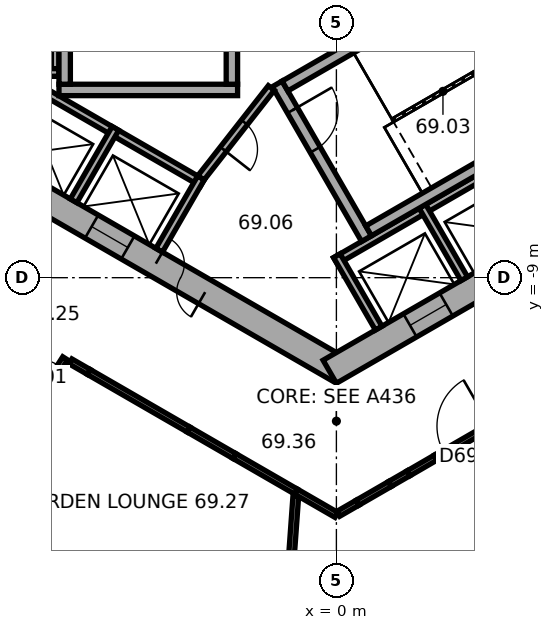
"""IFC4 building model, lengths in metres.
Left out: names, types, materials, properties, quantities, classifications, styles, units other than length and angle.
Written with IfcOpenShell. Run it as: python <this file> out.ifc"""

import sys

from ifc_helpers import new_model, si_unit, direction, frame, frame_2d, origin, place, context, subcontext, project, spatial, rectangle, extrude, element, fill, save


model = new_model("IFC4")
c1 = context("Model", 3, precision=1e-05, world=origin(), true_north=direction((0.0, 1.0)))
c2 = subcontext(c1, "Body", "Model", "MODEL_VIEW")
j1 = project(units=[si_unit("LENGTHUNIT", "METRE"), si_unit("PLANEANGLEUNIT", "RADIAN")], contexts=[c1])
p1 = place(None, origin())
s1 = spatial("IfcSite", under=j1, at=p1, CompositionType="ELEMENT")
p2 = place(p1, origin())
s2 = spatial("IfcBuilding", under=s1, at=p2, CompositionType="ELEMENT")
p3 = place(p2, frame((0.0, 0.0, 278.3)))
s3 = spatial("IfcBuildingStorey", under=s2, at=p3, CompositionType="ELEMENT", Elevation=278.3)
p4 = place(p3, frame((-10.025, -5.586, 0.0), z_axis=(0.0, 0.0, 1.0), x_axis=(0.866026453023, -0.499998182661, 0.0)))
e1 = element("IfcWall", 1, at=p4, inside=s3, PredefinedType="SHEAR", context=c2, shape_type="SweptSolid", body=[
    extrude(rectangle(XDim=11.778, YDim=0.7, at=frame_2d((5.889, 0.0))), origin(), (0.0, 0.0, 1.0), 7.4),
])
p5 = place(p4, frame((6.089, 0.0, 0.0)))
e2 = element("IfcOpeningElement", 2, at=p5, cuts=e1, PredefinedType="OPENING", context=c2, shape_type="SweptSolid", body=[
    extrude(rectangle(XDim=1.5, YDim=2.1, at=frame_2d((0.75, 1.05))), frame((0.0, 0.36, 0.0), z_axis=(0.0, -1.0, 0.0), x_axis=(1.0, 0.0, 0.0)), (0.0, 0.0, 1.0), 0.72),
])
p6 = place(p4, frame((1.539, 0.0, 0.0)))
e3 = element("IfcOpeningElement", 3, at=p6, cuts=e1, PredefinedType="OPENING", context=c2, shape_type="SweptSolid", body=[
    extrude(rectangle(XDim=1.1, YDim=2.1, at=frame_2d((0.55, 1.05))), frame((0.0, 0.36, 0.0), z_axis=(0.0, -1.0, 0.0), x_axis=(1.0, 0.0, 0.0)), (0.0, 0.0, 1.0), 0.72),
])
p7 = place(p4, frame((4.139, 0.0, 0.0)))
e4 = element("IfcOpeningElement", 4, at=p7, cuts=e1, PredefinedType="OPENING", context=c2, shape_type="SweptSolid", body=[
    extrude(rectangle(XDim=1.1, YDim=2.1, at=frame_2d((0.55, 1.05))), frame((0.0, 0.36, 0.0), z_axis=(0.0, -1.0, 0.0), x_axis=(1.0, 0.0, 0.0)), (0.0, 0.0, 1.0), 0.72),
])
p8 = place(p3, frame((-0.175, -11.475, 0.0), z_axis=(0.0, 0.0, 1.0), x_axis=(0.866026453023, 0.499998182661, 0.0)))
e5 = element("IfcWall", 5, at=p8, inside=s3, PredefinedType="SHEAR", context=c2, shape_type="SweptSolid", body=[
    extrude(rectangle(XDim=11.778, YDim=0.7, at=frame_2d((5.889, 0.0))), origin(), (0.0, 0.0, 1.0), 7.4),
])
p9 = place(p8, frame((2.439, 0.0, 0.0)))
e6 = element("IfcOpeningElement", 6, at=p9, cuts=e5, PredefinedType="OPENING", context=c2, shape_type="SweptSolid", body=[
    extrude(rectangle(XDim=1.1, YDim=2.1, at=frame_2d((0.55, 1.05))), frame((0.0, 0.36, 0.0), z_axis=(0.0, -1.0, 0.0), x_axis=(1.0, 0.0, 0.0)), (0.0, 0.0, 1.0), 0.72),
])
p10 = place(p8, frame((5.039, 0.0, 0.0)))
e7 = element("IfcOpeningElement", 7, at=p10, cuts=e5, PredefinedType="OPENING", context=c2, shape_type="SweptSolid", body=[
    extrude(rectangle(XDim=1.1, YDim=2.1, at=frame_2d((0.55, 1.05))), frame((0.0, 0.36, 0.0), z_axis=(0.0, -1.0, 0.0), x_axis=(1.0, 0.0, 0.0)), (0.0, 0.0, 1.0), 0.72),
])
p11 = place(p8, frame((7.639, 0.0, 0.0)))
e8 = element("IfcOpeningElement", 8, at=p11, cuts=e5, PredefinedType="OPENING", context=c2, shape_type="SweptSolid", body=[
    extrude(rectangle(XDim=1.1, YDim=2.1, at=frame_2d((0.55, 1.05))), frame((0.0, 0.36, 0.0), z_axis=(0.0, -1.0, 0.0), x_axis=(1.0, 0.0, 0.0)), (0.0, 0.0, 1.0), 0.72),
])
p12 = place(p3, frame((-16.626, -12.629, 0.0), z_axis=(0.0, 0.0, 1.0), x_axis=(0.866026460444, -0.499998169808, 0.0)))
e9 = element("IfcWall", 9, at=p12, inside=s3, PredefinedType="STANDARD", context=c2, shape_type="SweptSolid", body=[
    extrude(rectangle(XDim=17.731, YDim=0.2, at=frame_2d((8.866, 0.0))), origin(), (0.0, 0.0, 1.0), 7.4),
])
p13 = place(p12, frame((1.203, 0.0, 0.8)))
e10 = element("IfcOpeningElement", 10, at=p13, cuts=e9, PredefinedType="OPENING", context=c2, shape_type="SweptSolid", body=[
    extrude(rectangle(XDim=2.0, YDim=4.2, at=frame_2d((1.0, 2.1))), frame((0.0, 0.11, 0.0), z_axis=(0.0, -1.0, 0.0), x_axis=(1.0, 0.0, 0.0)), (0.0, 0.0, 1.0), 0.22),
])
p14 = place(p12, frame((4.535, 0.0, 0.8)))
e11 = element("IfcOpeningElement", 11, at=p14, cuts=e9, PredefinedType="OPENING", context=c2, shape_type="SweptSolid", body=[
    extrude(rectangle(XDim=2.0, YDim=4.2, at=frame_2d((1.0, 2.1))), frame((0.0, 0.11, 0.0), z_axis=(0.0, -1.0, 0.0), x_axis=(1.0, 0.0, 0.0)), (0.0, 0.0, 1.0), 0.22),
])
p15 = place(p12, frame((7.867, 0.0, 0.8)))
e12 = element("IfcOpeningElement", 12, at=p15, cuts=e9, PredefinedType="OPENING", context=c2, shape_type="SweptSolid", body=[
    extrude(rectangle(XDim=2.0, YDim=4.2, at=frame_2d((1.0, 2.1))), frame((0.0, 0.11, 0.0), z_axis=(0.0, -1.0, 0.0), x_axis=(1.0, 0.0, 0.0)), (0.0, 0.0, 1.0), 0.22),
])
p16 = place(p12, frame((11.198, 0.0, 0.8)))
e13 = element("IfcOpeningElement", 13, at=p16, cuts=e9, PredefinedType="OPENING", context=c2, shape_type="SweptSolid", body=[
    extrude(rectangle(XDim=2.0, YDim=4.2, at=frame_2d((1.0, 2.1))), frame((0.0, 0.11, 0.0), z_axis=(0.0, -1.0, 0.0), x_axis=(1.0, 0.0, 0.0)), (0.0, 0.0, 1.0), 0.22),
])
p17 = place(p12, frame((14.53, 0.0, 0.8)))
e14 = element("IfcOpeningElement", 14, at=p17, cuts=e9, PredefinedType="OPENING", context=c2, shape_type="SweptSolid", body=[
    extrude(rectangle(XDim=2.0, YDim=4.2, at=frame_2d((1.0, 2.1))), frame((0.0, 0.11, 0.0), z_axis=(0.0, -1.0, 0.0), x_axis=(1.0, 0.0, 0.0)), (0.0, 0.0, 1.0), 0.22),
])
p18 = place(p3, frame((2.58, -21.377, 0.0), z_axis=(0.0, 0.0, 1.0), x_axis=(0.833888592176, 0.551932800112, 0.0)))
e15 = element("IfcWall", 15, at=p18, inside=s3, PredefinedType="STANDARD", context=c2, shape_type="SweptSolid", body=[
    extrude(rectangle(XDim=17.731, YDim=0.2, at=frame_2d((8.866, 0.0))), origin(), (0.0, 0.0, 1.0), 7.4),
])
p19 = place(p18, frame((1.202, 0.0, 0.8)))
e16 = element("IfcOpeningElement", 16, at=p19, cuts=e15, PredefinedType="OPENING", context=c2, shape_type="SweptSolid", body=[
    extrude(rectangle(XDim=2.0, YDim=4.2, at=frame_2d((1.0, 2.1))), frame((0.0, 0.11, 0.0), z_axis=(0.0, -1.0, 0.0), x_axis=(1.0, 0.0, 0.0)), (0.0, 0.0, 1.0), 0.22),
])
p20 = place(p18, frame((4.533, 0.0, 0.8)))
e17 = element("IfcOpeningElement", 17, at=p20, cuts=e15, PredefinedType="OPENING", context=c2, shape_type="SweptSolid", body=[
    extrude(rectangle(XDim=2.0, YDim=4.2, at=frame_2d((1.0, 2.1))), frame((0.0, 0.11, 0.0), z_axis=(0.0, -1.0, 0.0), x_axis=(1.0, 0.0, 0.0)), (0.0, 0.0, 1.0), 0.22),
])
p21 = place(p18, frame((7.865, 0.0, 0.8)))
e18 = element("IfcOpeningElement", 18, at=p21, cuts=e15, PredefinedType="OPENING", context=c2, shape_type="SweptSolid", body=[
    extrude(rectangle(XDim=2.0, YDim=4.2, at=frame_2d((1.0, 2.1))), frame((0.0, 0.11, 0.0), z_axis=(0.0, -1.0, 0.0), x_axis=(1.0, 0.0, 0.0)), (0.0, 0.0, 1.0), 0.22),
])
p22 = place(p18, frame((11.197, 0.0, 0.8)))
e19 = element("IfcOpeningElement", 19, at=p22, cuts=e15, PredefinedType="OPENING", context=c2, shape_type="SweptSolid", body=[
    extrude(rectangle(XDim=2.0, YDim=4.2, at=frame_2d((1.0, 2.1))), frame((0.0, 0.11, 0.0), z_axis=(0.0, -1.0, 0.0), x_axis=(1.0, 0.0, 0.0)), (0.0, 0.0, 1.0), 0.22),
])
p23 = place(p18, frame((14.528, 0.0, 0.8)))
e20 = element("IfcOpeningElement", 20, at=p23, cuts=e15, PredefinedType="OPENING", context=c2, shape_type="SweptSolid", body=[
    extrude(rectangle(XDim=2.0, YDim=4.2, at=frame_2d((1.0, 2.1))), frame((0.0, 0.11, 0.0), z_axis=(0.0, -1.0, 0.0), x_axis=(1.0, 0.0, 0.0)), (0.0, 0.0, 1.0), 0.22),
])
p24 = place(p3, frame((-7.4, 4.3, 0.0), z_axis=(0.0, 0.0, 1.0), x_axis=(0.0, -1.0, 0.0)))
e21 = element("IfcWall", 21, at=p24, inside=s3, PredefinedType="PARTITIONING", context=c2, shape_type="SweptSolid", body=[
    extrude(rectangle(XDim=8.0, YDim=0.2, at=frame_2d((4.0, 0.0))), origin(), (0.0, 0.0, 1.0), 7.12),
])
p25 = place(p3, frame((-7.3, -3.6, 0.0), z_axis=(0.0, 0.0, 1.0), x_axis=(-1.0, 0.0, 0.0)))
e22 = element("IfcWall", 22, at=p25, inside=s3, PredefinedType="PARTITIONING", context=c2, shape_type="SweptSolid", body=[
    extrude(rectangle(XDim=2.2, YDim=0.2, at=frame_2d((1.1, 0.0))), origin(), (0.0, 0.0, 1.0), 7.12),
])
p26 = place(p3, frame((-8.203, -3.809, 0.0), z_axis=(0.0, 0.0, 1.0), x_axis=(0.866028230842, -0.499995103361, 0.0)))
e23 = element("IfcWall", 23, at=p26, inside=s3, PredefinedType="PARTITIONING", context=c2, shape_type="SweptSolid", body=[
    extrude(rectangle(XDim=5.4, YDim=0.2, at=frame_2d((2.7, 0.0))), origin(), (0.0, 0.0, 1.0), 7.12),
])
p27 = place(p3, frame((-5.815, -5.072, 0.0), z_axis=(0.0, 0.0, 1.0), x_axis=(-0.499946605688, -0.86605622881, 0.0)))
e24 = element("IfcWall", 24, at=p27, inside=s3, PredefinedType="PARTITIONING", context=c2, shape_type="SweptSolid", body=[
    extrude(rectangle(XDim=2.2, YDim=0.2, at=frame_2d((1.1, 0.0))), origin(), (0.0, 0.0, 1.0), 7.12),
])
p28 = place(p3, frame((-3.563, -6.372, 0.0), z_axis=(0.0, 0.0, 1.0), x_axis=(-0.499994660107, -0.866028486751, 0.0)))
e25 = element("IfcWall", 25, at=p28, inside=s3, PredefinedType="PARTITIONING", context=c2, shape_type="SweptSolid", body=[
    extrude(rectangle(XDim=2.2, YDim=0.2, at=frame_2d((1.1, 0.0))), origin(), (0.0, 0.0, 1.0), 7.12),
])
p29 = place(p3, frame((-0.024, -8.559, 0.0), z_axis=(0.0, 0.0, 1.0), x_axis=(0.866026010844, 0.49999894854, 0.0)))
e26 = element("IfcWall", 26, at=p29, inside=s3, PredefinedType="PARTITIONING", context=c2, shape_type="SweptSolid", body=[
    extrude(rectangle(XDim=8.0, YDim=0.2, at=frame_2d((4.0, 0.0))), origin(), (0.0, 0.0, 1.0), 7.12),
])
for number, where, z_axis, x_axis in (
    (27, (0.013, -8.422, 0.0), (0.0, 0.0, 1.0), (0.5, -0.866, 0.0)),
    (28, (2.264, -7.122, 0.0), (0.0, 0.0, 1.0), (0.5, -0.866, 0.0)),
):
    element("IfcWall", number, at=place(p3, frame(where, z_axis=z_axis, x_axis=x_axis)), inside=s3, PredefinedType="PARTITIONING", context=c2, shape_type="SweptSolid", body=[
        extrude(rectangle(XDim=2.2, YDim=0.2, at=frame_2d((1.1, 0.0))), origin(), (0.0, 0.0, 1.0), 7.12),
    ])
p30 = place(p3, frame((-2.6, -4.06, 0.0), z_axis=(0.0, 0.0, 1.0), x_axis=(-1.0, 0.0, 0.0)))
e29 = element("IfcWall", 29, at=p30, inside=s3, PredefinedType="SHEAR", context=c2, shape_type="SweptSolid", body=[
    extrude(rectangle(XDim=4.7, YDim=0.3, at=frame_2d((2.35, 0.0))), origin(), (0.0, 0.0, 1.0), 7.12),
])
for number, where, z_axis, x_axis in (
    (30, (-2.75, 3.15, 0.0), (0.0, 0.0, 1.0), (0.0, -1.0, 0.0)),
    (31, (-7.15, 3.15, 0.0), (0.0, 0.0, 1.0), (0.0, -1.0, 0.0)),
):
    element("IfcWall", number, at=place(p3, frame(where, z_axis=z_axis, x_axis=x_axis)), inside=s3, PredefinedType="SHEAR", context=c2, shape_type="SweptSolid", body=[
        extrude(rectangle(XDim=7.06, YDim=0.3, at=frame_2d((3.53, 0.0))), origin(), (0.0, 0.0, 1.0), 7.12),
    ])
p31 = place(p3, frame((-1.558, -3.902, 0.0), z_axis=(0.0, 0.0, 1.0), x_axis=(0.499977259774, -0.866038532462, 0.0)))
e32 = element("IfcWall", 32, at=p31, inside=s3, PredefinedType="SHEAR", context=c2, shape_type="SweptSolid", body=[
    extrude(rectangle(XDim=4.7, YDim=0.3, at=frame_2d((2.35, 0.0))), origin(), (0.0, 0.0, 1.0), 7.12),
])
p32 = place(p31, frame((0.8, 0.0, 0.0)))
e33 = element("IfcOpeningElement", 33, at=p32, cuts=e32, PredefinedType="OPENING", context=c2, shape_type="SweptSolid", body=[
    extrude(rectangle(XDim=1.2, YDim=2.1, at=frame_2d((0.6, 1.05))), frame((0.0, 0.16, 0.0), z_axis=(0.0, -1.0, 0.0), x_axis=(1.0, 0.0, 0.0)), (0.0, 0.0, 1.0), 0.32),
])
for number, where, z_axis, x_axis in (
    (34, (-1.353, -3.957, 0.0), (0.0, 0.0, 1.0), (0.866, 0.5, 0.0)),
    (35, (0.847, -7.767, 0.0), (0.0, 0.0, 1.0), (0.866, 0.5, 0.0)),
):
    element("IfcWall", number, at=place(p3, frame(where, z_axis=z_axis, x_axis=x_axis)), inside=s3, PredefinedType="SHEAR", context=c2, shape_type="SweptSolid", body=[
        extrude(rectangle(XDim=7.06, YDim=0.3, at=frame_2d((3.53, 0.0))), origin(), (0.0, 0.0, 1.0), 7.12),
    ])
p33 = place(p3, frame((-1.712, -4.008, 0.0), z_axis=(0.0, 0.0, 1.0), x_axis=(-0.616549420702, -0.787316208287, 0.0)))
e36 = element("IfcWall", 36, at=p33, inside=s3, PredefinedType="PARTITIONING", context=c2, shape_type="SweptSolid", body=[
    extrude(rectangle(XDim=3.002, YDim=0.2, at=frame_2d((1.501, 0.0))), origin(), (0.0, 0.0, 1.0), 7.12),
])
p34 = place(p33, frame((1.15, 0.0, 0.0)))
e37 = element("IfcOpeningElement", 37, at=p34, cuts=e36, PredefinedType="OPENING", context=c2, shape_type="SweptSolid", body=[
    extrude(rectangle(XDim=0.9, YDim=2.1, at=frame_2d((0.45, 1.05))), frame((0.0, 0.11, 0.0), z_axis=(0.0, -1.0, 0.0), x_axis=(1.0, 0.0, 0.0)), (0.0, 0.0, 1.0), 0.22),
])
p35 = place(p3, frame((-9.976, -15.545, 0.0), z_axis=(0.0, 0.0, 1.0), x_axis=(0.540123567873, 0.841585724349, 0.0)))
e38 = element("IfcWall", 38, at=p35, inside=s3, PredefinedType="PARTITIONING", context=c2, shape_type="SweptSolid", body=[
    extrude(rectangle(XDim=5.256, YDim=0.15, at=frame_2d((2.628, 0.0))), origin(), (0.0, 0.0, 1.0), 6.57),
])
p36 = place(p35, frame((3.606, 0.0, 0.0)))
e39 = element("IfcOpeningElement", 39, at=p36, cuts=e38, PredefinedType="OPENING", context=c2, shape_type="SweptSolid", body=[
    extrude(rectangle(XDim=1.4, YDim=2.4, at=frame_2d((0.7, 1.2))), frame((0.0, 0.085, 0.0), z_axis=(0.0, -1.0, 0.0), x_axis=(1.0, 0.0, 0.0)), (0.0, 0.0, 1.0), 0.17),
])
p37 = place(p3, frame((0.052, -15.212, 0.0), z_axis=(0.0, 0.0, 1.0), x_axis=(0.866171626203, 0.499746649774, 0.0)))
e40 = element("IfcWall", 40, at=p37, inside=s3, PredefinedType="PARTITIONING", context=c2, shape_type="SweptSolid", body=[
    extrude(rectangle(XDim=0.582, YDim=0.15, at=frame_2d((0.291, 0.0))), origin(), (0.0, 0.0, 1.0), 7.12),
])
p38 = place(p3, frame((0.556, -14.921, 0.0), z_axis=(0.0, 0.0, 1.0), x_axis=(0.865917507238, 0.500186835751, 0.0)))
e41 = element("IfcWall", 41, at=p38, inside=s3, PredefinedType="PARTITIONING", context=c2, shape_type="SweptSolid", body=[
    extrude(rectangle(XDim=0.986, YDim=0.15, at=frame_2d((0.493, 0.0))), origin(), (0.0, 0.0, 1.0), 7.12),
])
p39 = place(p3, frame((-1.068, -14.75, 0.0), z_axis=(0.0, 0.0, 1.0), x_axis=(-0.072252084435, -0.997386402702, 0.0)))
e42 = element("IfcWall", 42, at=p39, inside=s3, PredefinedType="PARTITIONING", context=c2, shape_type="SweptSolid", body=[
    extrude(rectangle(XDim=5.714, YDim=0.15, at=frame_2d((2.857, 0.0))), origin(), (0.0, 0.0, 1.0), 7.12),
])
p40 = place(p3, frame((-1.06, -14.631, 0.0), z_axis=(0.0, 0.0, 1.0), x_axis=(0.866172295251, -0.499745490164, 0.0)))
e43 = element("IfcWall", 43, at=p40, inside=s3, PredefinedType="PARTITIONING", context=c2, shape_type="SweptSolid", body=[
    extrude(rectangle(XDim=1.223, YDim=0.15, at=frame_2d((0.612, 0.0))), origin(), (0.0, 0.0, 1.0), 7.12),
])
p41 = place(p3, frame((-1.06, -14.631, 0.0), z_axis=(0.0, 0.0, 1.0), x_axis=(-0.8659514991, 0.500127984827, 0.0)))
e44 = element("IfcWall", 44, at=p41, inside=s3, PredefinedType="PARTITIONING", context=c2, shape_type="SweptSolid", body=[
    extrude(rectangle(XDim=1.876, YDim=0.15, at=frame_2d((0.938, 0.0))), origin(), (0.0, 0.0, 1.0), 7.12),
])
p42 = place(p3, frame((1.41, -14.428, 0.0), z_axis=(0.0, 0.0, 1.0), x_axis=(0.865940158947, 0.500147619332, 0.0)))
e45 = element("IfcWall", 45, at=p42, inside=s3, PredefinedType="PARTITIONING", context=c2, shape_type="SweptSolid", body=[
    extrude(rectangle(XDim=0.563, YDim=0.15, at=frame_2d((0.282, 0.0))), origin(), (0.0, 0.0, 1.0), 7.12),
])
p43 = place(p3, frame((1.904, -14.145, 0.0), z_axis=(0.0, 0.0, 1.0), x_axis=(0.864830459613, 0.502064015964, 0.0)))
e46 = element("IfcWall", 46, at=p43, inside=s3, PredefinedType="PARTITIONING", context=c2, shape_type="SweptSolid", body=[
    extrude(rectangle(XDim=0.824, YDim=0.15, at=frame_2d((0.412, 0.0))), origin(), (0.0, 0.0, 1.0), 7.12),
])
p44 = place(p3, frame((-3.888, -12.998, 0.0), z_axis=(0.0, 0.0, 1.0), x_axis=(0.866094923709, -0.499879568622, 0.0)))
e47 = element("IfcWall", 47, at=p44, inside=s3, PredefinedType="PARTITIONING", context=c2, shape_type="SweptSolid", body=[
    extrude(rectangle(XDim=1.39, YDim=0.15, at=frame_2d((0.695, 0.0))), origin(), (0.0, 0.0, 1.0), 7.12),
])
p45 = place(p3, frame((-3.888, -12.998, 0.0), z_axis=(0.0, 0.0, 1.0), x_axis=(-0.865984422536, 0.500070974888, 0.0)))
e48 = element("IfcWall", 48, at=p45, inside=s3, PredefinedType="PARTITIONING", context=c2, shape_type="SweptSolid", body=[
    extrude(rectangle(XDim=3.032, YDim=0.15, at=frame_2d((1.516, 0.0))), origin(), (0.0, 0.0, 1.0), 7.12),
])
p46 = place(p3, frame((5.817, -11.884, 0.0), z_axis=(0.0, 0.0, 1.0), x_axis=(-0.866001804008, -0.500040873783, 0.0)))
e49 = element("IfcWall", 49, at=p46, inside=s3, PredefinedType="PARTITIONING", context=c2, shape_type="SweptSolid", body=[
    extrude(rectangle(XDim=3.695, YDim=0.15, at=frame_2d((1.847, 0.0))), origin(), (0.0, 0.0, 1.0), 7.12),
])
p47 = place(p46, frame((2.044, 0.0, 0.0)))
e50 = element("IfcOpeningElement", 50, at=p47, cuts=e49, PredefinedType="OPENING", context=c2, shape_type="SweptSolid", body=[
    extrude(rectangle(XDim=1.4, YDim=2.4, at=frame_2d((0.7, 1.2))), frame((0.0, 0.085, 0.0), z_axis=(0.0, -1.0, 0.0), x_axis=(1.0, 0.0, 0.0)), (0.0, 0.0, 1.0), 0.17),
])
p48 = place(p3, frame((-6.996, -11.203, 0.0), z_axis=(0.0, 0.0, 1.0), x_axis=(0.866025182435, -0.500000383388, 0.0)))
e51 = element("IfcWall", 51, at=p48, inside=s3, PredefinedType="PARTITIONING", context=c2, shape_type="SweptSolid", body=[
    extrude(rectangle(XDim=0.558, YDim=0.15, at=frame_2d((0.279, 0.0))), origin(), (0.0, 0.0, 1.0), 7.12),
])
p49 = place(p5, origin())
e52 = element("IfcDoor", 52, at=p49, inside=s3, OperationType="DOUBLE_DOOR_SINGLE_SWING", PredefinedType="DOOR", context=c2, shape_type="SweptSolid", body=[
    extrude(rectangle(XDim=1.5, YDim=2.1, at=frame_2d((0.75, 1.05))), frame((0.0, 0.025, 0.0), z_axis=(0.0, -1.0, 0.0), x_axis=(1.0, 0.0, 0.0)), (0.0, 0.0, 1.0), 0.05),
])
fill(e2, e52)
p50 = place(p32, origin())
e53 = element("IfcDoor", 53, at=p50, inside=s3, OperationType="SINGLE_SWING_RIGHT", PredefinedType="DOOR", context=c2, shape_type="SweptSolid", body=[
    extrude(rectangle(XDim=1.2, YDim=2.1, at=frame_2d((0.6, 1.05))), frame((0.0, 0.025, 0.0), z_axis=(0.0, -1.0, 0.0), x_axis=(1.0, 0.0, 0.0)), (0.0, 0.0, 1.0), 0.05),
])
fill(e33, e53)
p51 = place(p34, origin())
e54 = element("IfcDoor", 54, at=p51, inside=s3, OperationType="SINGLE_SWING_LEFT", PredefinedType="DOOR", context=c2, shape_type="SweptSolid", body=[
    extrude(rectangle(XDim=0.9, YDim=2.1, at=frame_2d((0.45, 1.05))), frame((0.0, 0.025, 0.0), z_axis=(0.0, -1.0, 0.0), x_axis=(1.0, 0.0, 0.0)), (0.0, 0.0, 1.0), 0.05),
])
fill(e37, e54)
p52 = place(p7, origin())
e55 = element("IfcDoor", 55, at=p52, inside=s3, OperationType="DOUBLE_DOOR_SLIDING", PredefinedType="DOOR", context=c2, shape_type="SweptSolid", body=[
    extrude(rectangle(XDim=1.1, YDim=2.1, at=frame_2d((0.55, 1.05))), frame((0.0, 0.025, 0.0), z_axis=(0.0, -1.0, 0.0), x_axis=(1.0, 0.0, 0.0)), (0.0, 0.0, 1.0), 0.05),
])
fill(e4, e55)
p53 = place(p9, origin())
e56 = element("IfcDoor", 56, at=p53, inside=s3, OperationType="DOUBLE_DOOR_SLIDING", PredefinedType="DOOR", context=c2, shape_type="SweptSolid", body=[
    extrude(rectangle(XDim=1.1, YDim=2.1, at=frame_2d((0.55, 1.05))), frame((0.0, 0.025, 0.0), z_axis=(0.0, -1.0, 0.0), x_axis=(1.0, 0.0, 0.0)), (0.0, 0.0, 1.0), 0.05),
])
fill(e6, e56)
p54 = place(p36, origin())
e57 = element("IfcDoor", 57, at=p54, inside=s3, OperationType="SINGLE_SWING_LEFT", PredefinedType="DOOR", context=c2, shape_type="SweptSolid", body=[
    extrude(rectangle(XDim=1.4, YDim=2.4, at=frame_2d((0.7, 1.2))), frame((0.0, 0.025, 0.0), z_axis=(0.0, -1.0, 0.0), x_axis=(1.0, 0.0, 0.0)), (0.0, 0.0, 1.0), 0.05),
])
fill(e39, e57)
p55 = place(p47, origin())
e58 = element("IfcDoor", 58, at=p55, inside=s3, OperationType="SINGLE_SWING_LEFT", PredefinedType="DOOR", context=c2, shape_type="SweptSolid", body=[
    extrude(rectangle(XDim=1.4, YDim=2.4, at=frame_2d((0.7, 1.2))), frame((0.0, 0.025, 0.0), z_axis=(0.0, -1.0, 0.0), x_axis=(1.0, 0.0, 0.0)), (0.0, 0.0, 1.0), 0.05),
])
fill(e50, e58)
save(model, sys.argv[1])
